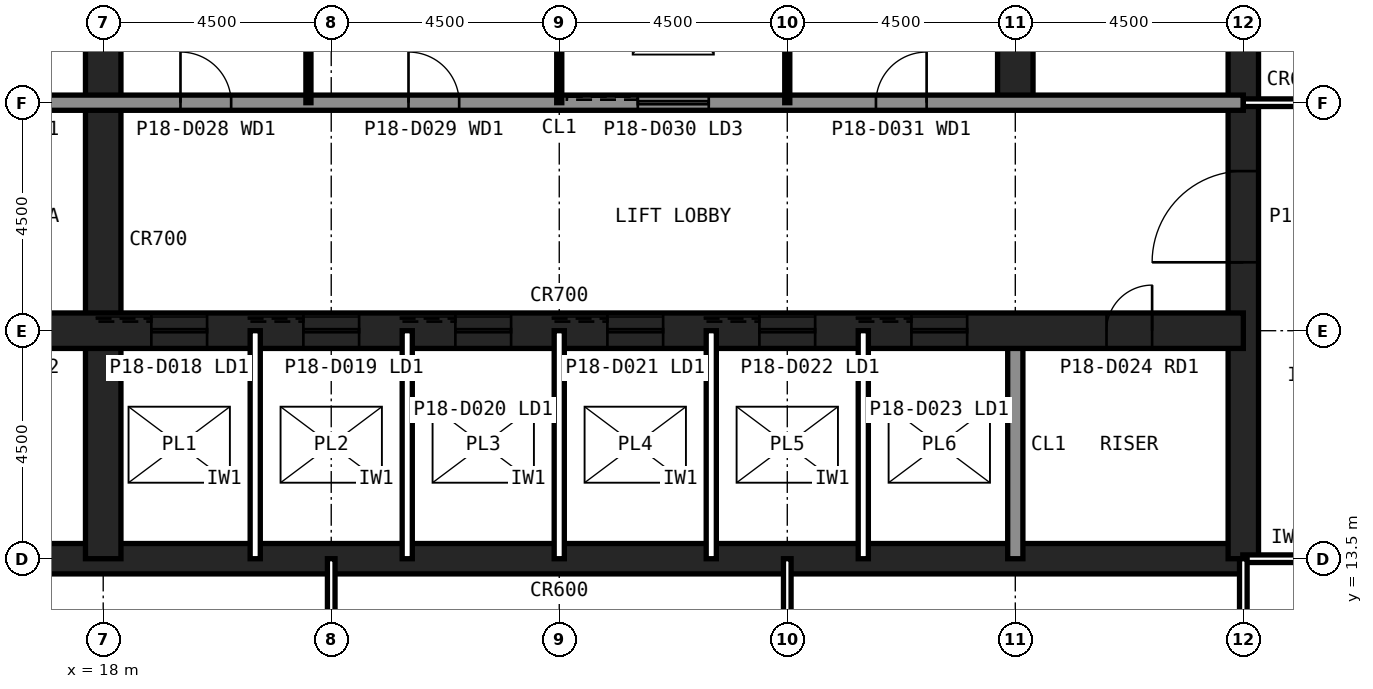
"""IFC4 building model, lengths in metres.
Left out: names, types, materials, properties, quantities, classifications, styles, units other than length and angle.
Written with IfcOpenShell. Run it as: python <this file> out.ifc"""

import sys

from ifc_helpers import new_model, si_unit, direction, frame, frame_2d, origin, place, context, subcontext, project, spatial, rectangle, extrude, element, fill, save


model = new_model("IFC4")
c1 = context("Model", 3, precision=1e-05, world=origin(), true_north=direction((0.0, 1.0)))
c2 = subcontext(c1, "Body", "Model", "MODEL_VIEW")
j1 = project(units=[si_unit("LENGTHUNIT", "METRE"), si_unit("PLANEANGLEUNIT", "RADIAN")], contexts=[c1])
p1 = place(None, origin())
s1 = spatial("IfcSite", under=j1, at=p1, CompositionType="ELEMENT")
p2 = place(p1, origin())
s2 = spatial("IfcBuilding", under=s1, at=p2, CompositionType="ELEMENT")
p3 = place(p2, frame((0.0, 0.0, 79.4)))
s3 = spatial("IfcBuildingStorey", under=s2, at=p3, CompositionType="ELEMENT", Elevation=79.4)
p4 = place(p3, frame((13.5, 13.5, 0.0), z_axis=(0.0, 0.0, 1.0), x_axis=(1.0, 0.0, 0.0)))
e1 = element("IfcWall", 1, at=p4, inside=s3, PredefinedType="SHEAR", context=c2, shape_type="SweptSolid", body=[
    extrude(rectangle(XDim=27.0, YDim=0.6, at=frame_2d((13.5, 0.0))), origin(), (0.0, 0.0, 1.0), 4.2),
])
p5 = place(p3, frame((40.5, 13.5, 0.0), z_axis=(0.0, 0.0, 1.0), x_axis=(0.0, 1.0, 0.0)))
e2 = element("IfcWall", 2, at=p5, inside=s3, PredefinedType="SHEAR", context=c2, shape_type="SweptSolid", body=[
    extrude(rectangle(XDim=27.0, YDim=0.6, at=frame_2d((13.5, 0.0))), origin(), (0.0, 0.0, 1.0), 4.2),
])
p6 = place(p5, frame((5.85, 0.0, 0.0)))
e3 = element("IfcOpeningElement", 3, at=p6, cuts=e2, PredefinedType="OPENING", context=c2, shape_type="SweptSolid", body=[
    extrude(rectangle(XDim=1.8, YDim=2.1, at=frame_2d((0.9, 1.05))), frame((0.0, 0.31, 0.0), z_axis=(0.0, -1.0, 0.0), x_axis=(1.0, 0.0, 0.0)), (0.0, 0.0, 1.0), 0.62),
])
p7 = place(p5, frame((19.65, 0.0, 0.0)))
e4 = element("IfcOpeningElement", 4, at=p7, cuts=e2, PredefinedType="OPENING", context=c2, shape_type="SweptSolid", body=[
    extrude(rectangle(XDim=1.2, YDim=2.1, at=frame_2d((0.6, 1.05))), frame((0.0, 0.31, 0.0), z_axis=(0.0, -1.0, 0.0), x_axis=(1.0, 0.0, 0.0)), (0.0, 0.0, 1.0), 0.62),
])
p8 = place(p3, frame((18.0, 13.5, 0.0), z_axis=(0.0, 0.0, 1.0), x_axis=(0.0, 1.0, 0.0)))
e5 = element("IfcWall", 5, at=p8, inside=s3, PredefinedType="SHEAR", context=c2, shape_type="SweptSolid", body=[
    extrude(rectangle(XDim=18.0, YDim=0.7, at=frame_2d((9.0, 0.0))), origin(), (0.0, 0.0, 1.0), 4.2),
])
p9 = place(p3, frame((36.0, 13.5, 0.0), z_axis=(0.0, 0.0, 1.0), x_axis=(0.0, 1.0, 0.0)))
e6 = element("IfcWall", 6, at=p9, inside=s3, PredefinedType="SOLIDWALL", context=c2, shape_type="SweptSolid", body=[
    extrude(rectangle(XDim=4.5, YDim=0.3, at=frame_2d((2.25, 0.0))), origin(), (0.0, 0.0, 1.0), 4.04),
])
p10 = place(p3, frame((36.0, 22.5, 0.0), z_axis=(0.0, 0.0, 1.0), x_axis=(0.0, 1.0, 0.0)))
e7 = element("IfcWall", 7, at=p10, inside=s3, PredefinedType="SHEAR", context=c2, shape_type="SweptSolid", body=[
    extrude(rectangle(XDim=18.0, YDim=0.7, at=frame_2d((9.0, 0.0))), origin(), (0.0, 0.0, 1.0), 4.2),
])
p11 = place(p3, frame((13.5, 18.0, 0.0), z_axis=(0.0, 0.0, 1.0), x_axis=(1.0, 0.0, 0.0)))
e8 = element("IfcWall", 8, at=p11, inside=s3, PredefinedType="SHEAR", context=c2, shape_type="SweptSolid", body=[
    extrude(rectangle(XDim=27.0, YDim=0.7, at=frame_2d((13.5, 0.0))), origin(), (0.0, 0.0, 1.0), 4.2),
])
p12 = place(p11, frame((24.3, 0.0, 0.0)))
e9 = element("IfcOpeningElement", 9, at=p12, cuts=e8, PredefinedType="OPENING", context=c2, shape_type="SweptSolid", body=[
    extrude(rectangle(XDim=0.9, YDim=2.1, at=frame_2d((0.45, 1.05))), frame((0.0, 0.36, 0.0), z_axis=(0.0, -1.0, 0.0), x_axis=(1.0, 0.0, 0.0)), (0.0, 0.0, 1.0), 0.72),
])
p13 = place(p11, frame((5.45, 0.0, 0.0)))
e10 = element("IfcOpeningElement", 10, at=p13, cuts=e8, PredefinedType="OPENING", context=c2, shape_type="SweptSolid", body=[
    extrude(rectangle(XDim=1.1, YDim=2.1, at=frame_2d((0.55, 1.05))), frame((0.0, 0.36, 0.0), z_axis=(0.0, -1.0, 0.0), x_axis=(1.0, 0.0, 0.0)), (0.0, 0.0, 1.0), 0.72),
])
p14 = place(p11, frame((8.45, 0.0, 0.0)))
e11 = element("IfcOpeningElement", 11, at=p14, cuts=e8, PredefinedType="OPENING", context=c2, shape_type="SweptSolid", body=[
    extrude(rectangle(XDim=1.1, YDim=2.1, at=frame_2d((0.55, 1.05))), frame((0.0, 0.36, 0.0), z_axis=(0.0, -1.0, 0.0), x_axis=(1.0, 0.0, 0.0)), (0.0, 0.0, 1.0), 0.72),
])
p15 = place(p11, frame((11.45, 0.0, 0.0)))
e12 = element("IfcOpeningElement", 12, at=p15, cuts=e8, PredefinedType="OPENING", context=c2, shape_type="SweptSolid", body=[
    extrude(rectangle(XDim=1.1, YDim=2.1, at=frame_2d((0.55, 1.05))), frame((0.0, 0.36, 0.0), z_axis=(0.0, -1.0, 0.0), x_axis=(1.0, 0.0, 0.0)), (0.0, 0.0, 1.0), 0.72),
])
p16 = place(p11, frame((14.45, 0.0, 0.0)))
e13 = element("IfcOpeningElement", 13, at=p16, cuts=e8, PredefinedType="OPENING", context=c2, shape_type="SweptSolid", body=[
    extrude(rectangle(XDim=1.1, YDim=2.1, at=frame_2d((0.55, 1.05))), frame((0.0, 0.36, 0.0), z_axis=(0.0, -1.0, 0.0), x_axis=(1.0, 0.0, 0.0)), (0.0, 0.0, 1.0), 0.72),
])
p17 = place(p11, frame((17.45, 0.0, 0.0)))
e14 = element("IfcOpeningElement", 14, at=p17, cuts=e8, PredefinedType="OPENING", context=c2, shape_type="SweptSolid", body=[
    extrude(rectangle(XDim=1.1, YDim=2.1, at=frame_2d((0.55, 1.05))), frame((0.0, 0.36, 0.0), z_axis=(0.0, -1.0, 0.0), x_axis=(1.0, 0.0, 0.0)), (0.0, 0.0, 1.0), 0.72),
])
p18 = place(p11, frame((20.45, 0.0, 0.0)))
e15 = element("IfcOpeningElement", 15, at=p18, cuts=e8, PredefinedType="OPENING", context=c2, shape_type="SweptSolid", body=[
    extrude(rectangle(XDim=1.1, YDim=2.1, at=frame_2d((0.55, 1.05))), frame((0.0, 0.36, 0.0), z_axis=(0.0, -1.0, 0.0), x_axis=(1.0, 0.0, 0.0)), (0.0, 0.0, 1.0), 0.72),
])
p19 = place(p11, frame((1.6, 0.0, 0.0)))
e16 = element("IfcOpeningElement", 16, at=p19, cuts=e8, PredefinedType="OPENING", context=c2, shape_type="SweptSolid", body=[
    extrude(rectangle(XDim=1.3, YDim=2.2, at=frame_2d((0.65, 1.1))), frame((0.0, 0.36, 0.0), z_axis=(0.0, -1.0, 0.0), x_axis=(1.0, 0.0, 0.0)), (0.0, 0.0, 1.0), 0.72),
])
p20 = place(p3, frame((13.5, 22.5, 0.0), z_axis=(0.0, 0.0, 1.0), x_axis=(1.0, 0.0, 0.0)))
e17 = element("IfcWall", 17, at=p20, inside=s3, PredefinedType="SOLIDWALL", context=c2, shape_type="SweptSolid", body=[
    extrude(rectangle(XDim=27.0, YDim=0.3, at=frame_2d((13.5, 0.0))), origin(), (0.0, 0.0, 1.0), 4.04),
])
p21 = place(p20, frame((1.65, 0.0, 0.0)))
e18 = element("IfcOpeningElement", 18, at=p21, cuts=e17, PredefinedType="OPENING", context=c2, shape_type="SweptSolid", body=[
    extrude(rectangle(XDim=1.2, YDim=2.1, at=frame_2d((0.6, 1.05))), frame((0.0, 0.16, 0.0), z_axis=(0.0, -1.0, 0.0), x_axis=(1.0, 0.0, 0.0)), (0.0, 0.0, 1.0), 0.32),
])
p22 = place(p20, frame((6.025, 0.0, 0.0)))
e19 = element("IfcOpeningElement", 19, at=p22, cuts=e17, PredefinedType="OPENING", context=c2, shape_type="SweptSolid", body=[
    extrude(rectangle(XDim=1.0, YDim=2.1, at=frame_2d((0.5, 1.05))), frame((0.0, 0.16, 0.0), z_axis=(0.0, -1.0, 0.0), x_axis=(1.0, 0.0, 0.0)), (0.0, 0.0, 1.0), 0.32),
])
p23 = place(p20, frame((10.525, 0.0, 0.0)))
e20 = element("IfcOpeningElement", 20, at=p23, cuts=e17, PredefinedType="OPENING", context=c2, shape_type="SweptSolid", body=[
    extrude(rectangle(XDim=1.0, YDim=2.1, at=frame_2d((0.5, 1.05))), frame((0.0, 0.16, 0.0), z_axis=(0.0, -1.0, 0.0), x_axis=(1.0, 0.0, 0.0)), (0.0, 0.0, 1.0), 0.32),
])
p24 = place(p20, frame((19.75, 0.0, 0.0)))
e21 = element("IfcOpeningElement", 21, at=p24, cuts=e17, PredefinedType="OPENING", context=c2, shape_type="SweptSolid", body=[
    extrude(rectangle(XDim=1.0, YDim=2.1, at=frame_2d((0.5, 1.05))), frame((0.0, 0.16, 0.0), z_axis=(0.0, -1.0, 0.0), x_axis=(1.0, 0.0, 0.0)), (0.0, 0.0, 1.0), 0.32),
])
p25 = place(p20, frame((15.05, 0.0, 0.0)))
e22 = element("IfcOpeningElement", 22, at=p25, cuts=e17, PredefinedType="OPENING", context=c2, shape_type="SweptSolid", body=[
    extrude(rectangle(XDim=1.4, YDim=2.4, at=frame_2d((0.7, 1.2))), frame((0.0, 0.16, 0.0), z_axis=(0.0, -1.0, 0.0), x_axis=(1.0, 0.0, 0.0)), (0.0, 0.0, 1.0), 0.32),
])
for number, where, z_axis, x_axis in (
    (23, (21.0, 13.5, 0.0), (0.0, 0.0, 1.0), (0.0, 1.0, 0.0)),
    (24, (24.0, 13.5, 0.0), (0.0, 0.0, 1.0), (0.0, 1.0, 0.0)),
    (25, (27.0, 13.5, 0.0), (0.0, 0.0, 1.0), (0.0, 1.0, 0.0)),
    (26, (30.0, 13.5, 0.0), (0.0, 0.0, 1.0), (0.0, 1.0, 0.0)),
    (27, (33.0, 13.5, 0.0), (0.0, 0.0, 1.0), (0.0, 1.0, 0.0)),
):
    element("IfcWall", number, at=place(p3, frame(where, z_axis=z_axis, x_axis=x_axis)), inside=s3, PredefinedType="PARTITIONING", context=c2, shape_type="SweptSolid", body=[
        extrude(rectangle(XDim=4.5, YDim=0.2, at=frame_2d((2.25, 0.0))), origin(), (0.0, 0.0, 1.0), 4.04),
    ])
for number, where, z_axis, x_axis in (
    (28, (22.05, 22.5, 0.0), (0.0, 0.0, 1.0), (0.0, 1.0, 0.0)),
    (29, (27.0, 22.5, 0.0), (0.0, 0.0, 1.0), (0.0, 1.0, 0.0)),
    (30, (31.5, 22.5, 0.0), (0.0, 0.0, 1.0), (0.0, 1.0, 0.0)),
):
    element("IfcWall", number, at=place(p3, frame(where, z_axis=z_axis, x_axis=x_axis)), inside=s3, PredefinedType="PLUMBINGWALL", context=c2, shape_type="SweptSolid", body=[
        extrude(rectangle(XDim=9.0, YDim=0.1, at=frame_2d((4.5, 0.0))), origin(), (0.0, 0.0, 1.0), 4.04),
    ])
p26 = place(p3, frame((40.49, 13.5, 0.0), z_axis=(0.0, 0.0, 1.0), x_axis=(1.0, 0.0, 0.0)))
e31 = element("IfcWall", 31, at=p26, inside=s3, PredefinedType="PARTITIONING", context=c2, shape_type="SweptSolid", body=[
    extrude(rectangle(XDim=1.81, YDim=0.15, at=frame_2d((0.905, 0.0))), origin(), (0.0, 0.0, 1.0), 3.189),
])
p27 = place(p3, frame((40.5, 22.5, 0.0), z_axis=(0.0, 0.0, 1.0), x_axis=(1.0, 0.0, 0.0)))
e32 = element("IfcWall", 32, at=p27, inside=s3, PredefinedType="PARTITIONING", context=c2, shape_type="SweptSolid", body=[
    extrude(rectangle(XDim=3.6, YDim=0.15, at=frame_2d((1.8, 0.0))), origin(), (0.0, 0.0, 1.0), 3.189),
])
p28 = place(p3, frame((40.5, 5.4, 0.0), z_axis=(0.0, 0.0, 1.0), x_axis=(0.0, 1.0, 0.0)))
e33 = element("IfcWall", 33, at=p28, inside=s3, PredefinedType="PARTITIONING", context=c2, shape_type="SweptSolid", body=[
    extrude(rectangle(XDim=8.1, YDim=0.15, at=frame_2d((4.05, 0.0))), origin(), (0.0, 0.0, 1.0), 3.189),
])
p29 = place(p28, frame((3.55, 0.0, 0.0)))
e34 = element("IfcOpeningElement", 34, at=p29, cuts=e33, PredefinedType="OPENING", context=c2, shape_type="SweptSolid", body=[
    extrude(rectangle(XDim=1.0, YDim=2.1, at=frame_2d((0.5, 1.05))), frame((0.0, 0.085, 0.0), z_axis=(0.0, -1.0, 0.0), x_axis=(1.0, 0.0, 0.0)), (0.0, 0.0, 1.0), 0.17),
])
p30 = place(p3, frame((22.5, 13.5, 0.0), z_axis=(0.0, 0.0, 1.0), x_axis=(0.0, -1.0, 0.0)))
e35 = element("IfcWall", 35, at=p30, inside=s3, PredefinedType="PARTITIONING", context=c2, shape_type="SweptSolid", body=[
    extrude(rectangle(XDim=8.1, YDim=0.15, at=frame_2d((4.05, 0.0))), origin(), (0.0, 0.0, 1.0), 3.189),
])
p31 = place(p30, frame((3.55, 0.0, 0.0)))
e36 = element("IfcOpeningElement", 36, at=p31, cuts=e35, PredefinedType="OPENING", context=c2, shape_type="SweptSolid", body=[
    extrude(rectangle(XDim=1.0, YDim=2.1, at=frame_2d((0.5, 1.05))), frame((0.0, 0.085, 0.0), z_axis=(0.0, -1.0, 0.0), x_axis=(1.0, 0.0, 0.0)), (0.0, 0.0, 1.0), 0.17),
])
p32 = place(p3, frame((31.5, 13.5, 0.0), z_axis=(0.0, 0.0, 1.0), x_axis=(0.0, -1.0, 0.0)))
e37 = element("IfcWall", 37, at=p32, inside=s3, PredefinedType="PARTITIONING", context=c2, shape_type="SweptSolid", body=[
    extrude(rectangle(XDim=8.1, YDim=0.15, at=frame_2d((4.05, 0.0))), origin(), (0.0, 0.0, 1.0), 3.189),
])
p33 = place(p32, frame((3.55, 0.0, 0.0)))
e38 = element("IfcOpeningElement", 38, at=p33, cuts=e37, PredefinedType="OPENING", context=c2, shape_type="SweptSolid", body=[
    extrude(rectangle(XDim=1.0, YDim=2.1, at=frame_2d((0.5, 1.05))), frame((0.0, 0.085, 0.0), z_axis=(0.0, -1.0, 0.0), x_axis=(1.0, 0.0, 0.0)), (0.0, 0.0, 1.0), 0.17),
])
p34 = place(p6, origin())
e39 = element("IfcDoor", 39, at=p34, inside=s3, OperationType="SINGLE_SWING_LEFT", PredefinedType="DOOR", context=c2, shape_type="SweptSolid", body=[
    extrude(rectangle(XDim=1.8, YDim=2.1, at=frame_2d((0.9, 1.05))), frame((0.0, 0.025, 0.0), z_axis=(0.0, -1.0, 0.0), x_axis=(1.0, 0.0, 0.0)), (0.0, 0.0, 1.0), 0.05),
])
fill(e3, e39)
p35 = place(p22, origin())
e40 = element("IfcDoor", 40, at=p35, inside=s3, OperationType="SINGLE_SWING_LEFT", PredefinedType="DOOR", context=c2, shape_type="SweptSolid", body=[
    extrude(rectangle(XDim=1.0, YDim=2.1, at=frame_2d((0.5, 1.05))), frame((0.0, 0.025, 0.0), z_axis=(0.0, -1.0, 0.0), x_axis=(1.0, 0.0, 0.0)), (0.0, 0.0, 1.0), 0.05),
])
fill(e19, e40)
p36 = place(p23, origin())
e41 = element("IfcDoor", 41, at=p36, inside=s3, OperationType="SINGLE_SWING_LEFT", PredefinedType="DOOR", context=c2, shape_type="SweptSolid", body=[
    extrude(rectangle(XDim=1.0, YDim=2.1, at=frame_2d((0.5, 1.05))), frame((0.0, 0.025, 0.0), z_axis=(0.0, -1.0, 0.0), x_axis=(1.0, 0.0, 0.0)), (0.0, 0.0, 1.0), 0.05),
])
fill(e20, e41)
p37 = place(p24, origin())
e42 = element("IfcDoor", 42, at=p37, inside=s3, OperationType="SINGLE_SWING_RIGHT", PredefinedType="DOOR", context=c2, shape_type="SweptSolid", body=[
    extrude(rectangle(XDim=1.0, YDim=2.1, at=frame_2d((0.5, 1.05))), frame((0.0, 0.025, 0.0), z_axis=(0.0, -1.0, 0.0), x_axis=(1.0, 0.0, 0.0)), (0.0, 0.0, 1.0), 0.05),
])
fill(e21, e42)
p38 = place(p12, origin())
e43 = element("IfcDoor", 43, at=p38, inside=s3, OperationType="SINGLE_SWING_RIGHT", PredefinedType="DOOR", context=c2, shape_type="SweptSolid", body=[
    extrude(rectangle(XDim=0.9, YDim=2.1, at=frame_2d((0.45, 1.05))), frame((0.0, 0.025, 0.0), z_axis=(0.0, -1.0, 0.0), x_axis=(1.0, 0.0, 0.0)), (0.0, 0.0, 1.0), 0.05),
])
fill(e9, e43)
p39 = place(p13, origin())
e44 = element("IfcDoor", 44, at=p39, inside=s3, OperationType="SLIDING_TO_LEFT", PredefinedType="DOOR", context=c2, shape_type="SweptSolid", body=[
    extrude(rectangle(XDim=1.1, YDim=2.1, at=frame_2d((0.55, 1.05))), frame((0.0, 0.025, 0.0), z_axis=(0.0, -1.0, 0.0), x_axis=(1.0, 0.0, 0.0)), (0.0, 0.0, 1.0), 0.05),
])
fill(e10, e44)
p40 = place(p14, origin())
e45 = element("IfcDoor", 45, at=p40, inside=s3, OperationType="SLIDING_TO_LEFT", PredefinedType="DOOR", context=c2, shape_type="SweptSolid", body=[
    extrude(rectangle(XDim=1.1, YDim=2.1, at=frame_2d((0.55, 1.05))), frame((0.0, 0.025, 0.0), z_axis=(0.0, -1.0, 0.0), x_axis=(1.0, 0.0, 0.0)), (0.0, 0.0, 1.0), 0.05),
])
fill(e11, e45)
p41 = place(p15, origin())
e46 = element("IfcDoor", 46, at=p41, inside=s3, OperationType="SLIDING_TO_LEFT", PredefinedType="DOOR", context=c2, shape_type="SweptSolid", body=[
    extrude(rectangle(XDim=1.1, YDim=2.1, at=frame_2d((0.55, 1.05))), frame((0.0, 0.025, 0.0), z_axis=(0.0, -1.0, 0.0), x_axis=(1.0, 0.0, 0.0)), (0.0, 0.0, 1.0), 0.05),
])
fill(e12, e46)
p42 = place(p16, origin())
e47 = element("IfcDoor", 47, at=p42, inside=s3, OperationType="SLIDING_TO_LEFT", PredefinedType="DOOR", context=c2, shape_type="SweptSolid", body=[
    extrude(rectangle(XDim=1.1, YDim=2.1, at=frame_2d((0.55, 1.05))), frame((0.0, 0.025, 0.0), z_axis=(0.0, -1.0, 0.0), x_axis=(1.0, 0.0, 0.0)), (0.0, 0.0, 1.0), 0.05),
])
fill(e13, e47)
p43 = place(p17, origin())
e48 = element("IfcDoor", 48, at=p43, inside=s3, OperationType="SLIDING_TO_LEFT", PredefinedType="DOOR", context=c2, shape_type="SweptSolid", body=[
    extrude(rectangle(XDim=1.1, YDim=2.1, at=frame_2d((0.55, 1.05))), frame((0.0, 0.025, 0.0), z_axis=(0.0, -1.0, 0.0), x_axis=(1.0, 0.0, 0.0)), (0.0, 0.0, 1.0), 0.05),
])
fill(e14, e48)
p44 = place(p18, origin())
e49 = element("IfcDoor", 49, at=p44, inside=s3, OperationType="SLIDING_TO_LEFT", PredefinedType="DOOR", context=c2, shape_type="SweptSolid", body=[
    extrude(rectangle(XDim=1.1, YDim=2.1, at=frame_2d((0.55, 1.05))), frame((0.0, 0.025, 0.0), z_axis=(0.0, -1.0, 0.0), x_axis=(1.0, 0.0, 0.0)), (0.0, 0.0, 1.0), 0.05),
])
fill(e15, e49)
p45 = place(p25, origin())
e50 = element("IfcDoor", 50, at=p45, inside=s3, OperationType="SLIDING_TO_LEFT", PredefinedType="DOOR", context=c2, shape_type="SweptSolid", body=[
    extrude(rectangle(XDim=1.4, YDim=2.4, at=frame_2d((0.7, 1.2))), frame((0.0, 0.025, 0.0), z_axis=(0.0, -1.0, 0.0), x_axis=(1.0, 0.0, 0.0)), (0.0, 0.0, 1.0), 0.05),
])
fill(e22, e50)
save(model, sys.argv[1])
